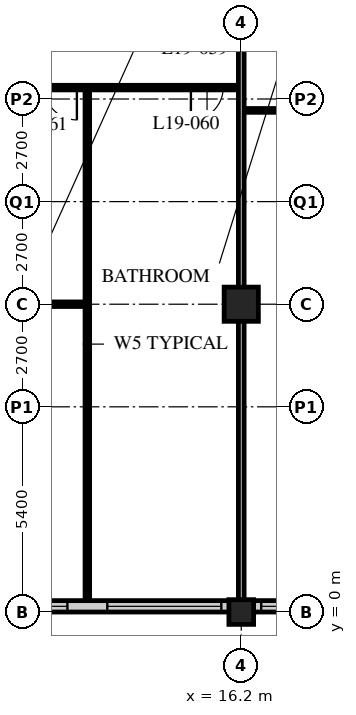
"""IFC4 building model, lengths in metres.
Left out: names, types, materials, properties, quantities, classifications, styles, units other than length and angle.
Written with IfcOpenShell. Run it as: python <this file> out.ifc"""

import sys

from ifc_helpers import new_model, si_unit, direction, frame, frame_2d, origin, origin_2d, place, context, subcontext, project, spatial, rectangle, hollow_rectangle, extrude, element, fill, save


model = new_model("IFC4")
c1 = context("Model", 3, precision=1e-05, world=origin(), true_north=direction((0.0, 1.0)))
c2 = subcontext(c1, "Body", "Model", "MODEL_VIEW")
j1 = project(units=[si_unit("LENGTHUNIT", "METRE"), si_unit("PLANEANGLEUNIT", "RADIAN")], contexts=[c1])
p1 = place(None, origin())
s1 = spatial("IfcSite", under=j1, at=p1, CompositionType="ELEMENT")
p2 = place(p1, origin())
s2 = spatial("IfcBuilding", under=s1, at=p2, CompositionType="ELEMENT")
p3 = place(p2, frame((0.0, 0.0, 77.2)))
s3 = spatial("IfcBuildingStorey", under=s2, at=p3, CompositionType="ELEMENT", Elevation=77.2)
p4 = place(p3, frame((16.2, 0.0, 0.0), z_axis=(0.0, 0.0, 1.0), x_axis=(1.0, 0.0, 0.0)))
e1 = element("IfcColumn", 1, at=p4, inside=s3, PredefinedType="COLUMN", context=c2, shape_type="SweptSolid", body=[
    extrude(hollow_rectangle(XDim=0.65, YDim=0.65, WallThickness=0.05, at=origin_2d()), origin(), (0.0, 0.0, 1.0), 3.4),
])
p5 = place(p3, frame((16.2, 8.1, 0.0), z_axis=(0.0, 0.0, 1.0), x_axis=(1.0, 0.0, 0.0)))
e2 = element("IfcColumn", 2, at=p5, inside=s3, PredefinedType="COLUMN", context=c2, shape_type="SweptSolid", body=[
    extrude(hollow_rectangle(XDim=0.9, YDim=0.9, WallThickness=0.09, at=origin_2d()), origin(), (0.0, 0.0, 1.0), 3.4),
])
p6 = place(p3, frame((8.4, 0.15, 0.0), z_axis=(0.0, 0.0, 1.0), x_axis=(1.0, 0.0, 0.0)))
e3 = element("IfcWall", 3, at=p6, inside=s3, PredefinedType="SOLIDWALL", context=c2, shape_type="SweptSolid", body=[
    extrude(rectangle(XDim=40.2, YDim=0.3, at=frame_2d((20.1, 0.0))), origin(), (0.0, 0.0, 1.0), 3.19),
])
p7 = place(p6, frame((0.225, 0.0, 0.9)))
e4 = element("IfcOpeningElement", 4, at=p7, cuts=e3, PredefinedType="OPENING", context=c2, shape_type="SweptSolid", body=[
    extrude(rectangle(XDim=3.0, YDim=1.5, at=frame_2d((1.5, 0.75))), frame((0.0, 0.16, 0.0), z_axis=(0.0, -1.0, 0.0), x_axis=(1.0, 0.0, 0.0)), (0.0, 0.0, 1.0), 0.32),
])
p8 = place(p6, frame((4.275, 0.0, 0.9)))
e5 = element("IfcOpeningElement", 5, at=p8, cuts=e3, PredefinedType="OPENING", context=c2, shape_type="SweptSolid", body=[
    extrude(rectangle(XDim=3.0, YDim=1.5, at=frame_2d((1.5, 0.75))), frame((0.0, 0.16, 0.0), z_axis=(0.0, -1.0, 0.0), x_axis=(1.0, 0.0, 0.0)), (0.0, 0.0, 1.0), 0.32),
])
p9 = place(p6, frame((8.325, 0.0, 0.9)))
e6 = element("IfcOpeningElement", 6, at=p9, cuts=e3, PredefinedType="OPENING", context=c2, shape_type="SweptSolid", body=[
    extrude(rectangle(XDim=3.0, YDim=1.5, at=frame_2d((1.5, 0.75))), frame((0.0, 0.16, 0.0), z_axis=(0.0, -1.0, 0.0), x_axis=(1.0, 0.0, 0.0)), (0.0, 0.0, 1.0), 0.32),
])
p10 = place(p6, frame((12.375, 0.0, 0.9)))
e7 = element("IfcOpeningElement", 7, at=p10, cuts=e3, PredefinedType="OPENING", context=c2, shape_type="SweptSolid", body=[
    extrude(rectangle(XDim=3.0, YDim=1.5, at=frame_2d((1.5, 0.75))), frame((0.0, 0.16, 0.0), z_axis=(0.0, -1.0, 0.0), x_axis=(1.0, 0.0, 0.0)), (0.0, 0.0, 1.0), 0.32),
])
p11 = place(p6, frame((16.425, 0.0, 0.9)))
e8 = element("IfcOpeningElement", 8, at=p11, cuts=e3, PredefinedType="OPENING", context=c2, shape_type="SweptSolid", body=[
    extrude(rectangle(XDim=3.0, YDim=1.5, at=frame_2d((1.5, 0.75))), frame((0.0, 0.16, 0.0), z_axis=(0.0, -1.0, 0.0), x_axis=(1.0, 0.0, 0.0)), (0.0, 0.0, 1.0), 0.32),
])
p12 = place(p6, frame((20.475, 0.0, 0.9)))
e9 = element("IfcOpeningElement", 9, at=p12, cuts=e3, PredefinedType="OPENING", context=c2, shape_type="SweptSolid", body=[
    extrude(rectangle(XDim=3.0, YDim=1.5, at=frame_2d((1.5, 0.75))), frame((0.0, 0.16, 0.0), z_axis=(0.0, -1.0, 0.0), x_axis=(1.0, 0.0, 0.0)), (0.0, 0.0, 1.0), 0.32),
])
p13 = place(p6, frame((24.525, 0.0, 0.9)))
e10 = element("IfcOpeningElement", 10, at=p13, cuts=e3, PredefinedType="OPENING", context=c2, shape_type="SweptSolid", body=[
    extrude(rectangle(XDim=3.0, YDim=1.5, at=frame_2d((1.5, 0.75))), frame((0.0, 0.16, 0.0), z_axis=(0.0, -1.0, 0.0), x_axis=(1.0, 0.0, 0.0)), (0.0, 0.0, 1.0), 0.32),
])
p14 = place(p6, frame((28.575, 0.0, 0.9)))
e11 = element("IfcOpeningElement", 11, at=p14, cuts=e3, PredefinedType="OPENING", context=c2, shape_type="SweptSolid", body=[
    extrude(rectangle(XDim=3.0, YDim=1.5, at=frame_2d((1.5, 0.75))), frame((0.0, 0.16, 0.0), z_axis=(0.0, -1.0, 0.0), x_axis=(1.0, 0.0, 0.0)), (0.0, 0.0, 1.0), 0.32),
])
p15 = place(p6, frame((32.625, 0.0, 0.9)))
e12 = element("IfcOpeningElement", 12, at=p15, cuts=e3, PredefinedType="OPENING", context=c2, shape_type="SweptSolid", body=[
    extrude(rectangle(XDim=3.0, YDim=1.5, at=frame_2d((1.5, 0.75))), frame((0.0, 0.16, 0.0), z_axis=(0.0, -1.0, 0.0), x_axis=(1.0, 0.0, 0.0)), (0.0, 0.0, 1.0), 0.32),
])
p16 = place(p6, frame((36.675, 0.0, 0.9)))
e13 = element("IfcOpeningElement", 13, at=p16, cuts=e3, PredefinedType="OPENING", context=c2, shape_type="SweptSolid", body=[
    extrude(rectangle(XDim=3.0, YDim=1.5, at=frame_2d((1.5, 0.75))), frame((0.0, 0.16, 0.0), z_axis=(0.0, -1.0, 0.0), x_axis=(1.0, 0.0, 0.0)), (0.0, 0.0, 1.0), 0.32),
])
p17 = place(p3, frame((16.2, 13.2, 0.0), z_axis=(0.0, 0.0, 1.0), x_axis=(1.0, 0.0, 0.0)))
e14 = element("IfcWall", 14, at=p17, inside=s3, PredefinedType="PARTITIONING", context=c2, shape_type="SweptSolid", body=[
    extrude(rectangle(XDim=2.3, YDim=0.1, at=frame_2d((1.15, 0.0))), origin(), (0.0, 0.0, 1.0), 3.19),
])
p18 = place(p3, frame((8.15, 13.8, 0.0), z_axis=(0.0, 0.0, 1.0), x_axis=(1.0, 0.0, 0.0)))
e15 = element("IfcWall", 15, at=p18, inside=s3, PredefinedType="PARTITIONING", context=c2, shape_type="SweptSolid", body=[
    extrude(rectangle(XDim=8.05, YDim=0.12, at=frame_2d((4.025, 0.0))), origin(), (0.0, 0.0, 1.0), 3.19),
])
p19 = place(p18, frame((6.725, 0.0, 0.0)))
e16 = element("IfcOpeningElement", 16, at=p19, cuts=e15, PredefinedType="OPENING", context=c2, shape_type="SweptSolid", body=[
    extrude(rectangle(XDim=0.85, YDim=2.1, at=frame_2d((0.425, 1.05))), frame((0.0, 0.07, 0.0), z_axis=(0.0, -1.0, 0.0), x_axis=(1.0, 0.0, 0.0)), (0.0, 0.0, 1.0), 0.14),
])
p20 = place(p18, frame((2.875, 0.0, 0.0)))
e17 = element("IfcOpeningElement", 17, at=p20, cuts=e15, PredefinedType="OPENING", context=c2, shape_type="SweptSolid", body=[
    extrude(rectangle(XDim=0.85, YDim=2.1, at=frame_2d((0.425, 1.05))), frame((0.0, 0.07, 0.0), z_axis=(0.0, -1.0, 0.0), x_axis=(1.0, 0.0, 0.0)), (0.0, 0.0, 1.0), 0.14),
])
p21 = place(p3, frame((12.15, 13.8, 0.0), z_axis=(0.0, 0.0, 1.0), x_axis=(0.0, -1.0, 0.0)))
e18 = element("IfcWall", 18, at=p21, inside=s3, PredefinedType="PARTITIONING", context=c2, shape_type="SweptSolid", body=[
    extrude(rectangle(XDim=13.5, YDim=0.12, at=frame_2d((6.75, 0.0))), origin(), (0.0, 0.0, 1.0), 3.19),
])
p22 = place(p3, frame((16.2, 16.2, 0.0), z_axis=(0.0, 0.0, 1.0), x_axis=(0.0, -1.0, 0.0)))
e19 = element("IfcWall", 19, at=p22, inside=s3, PredefinedType="PARTITIONING", context=c2, shape_type="SweptSolid", body=[
    extrude(rectangle(XDim=15.9, YDim=0.15, at=frame_2d((7.95, 0.0))), origin(), (0.0, 0.0, 1.0), 2.428),
])
p23 = place(p3, frame((12.15, 8.1, 0.0), z_axis=(0.0, 0.0, 1.0), x_axis=(-1.0, 0.0, 0.0)))
e20 = element("IfcWall", 20, at=p23, inside=s3, PredefinedType="PARTITIONING", context=c2, shape_type="SweptSolid", body=[
    extrude(rectangle(XDim=3.6, YDim=0.12, at=frame_2d((1.8, 0.0))), origin(), (0.0, 0.0, 1.0), 2.428),
])
p24 = place(p7, origin())
e21 = element("IfcWindow", 21, at=p24, inside=s3, PartitioningType="SINGLE_PANEL", PredefinedType="WINDOW", context=c2, shape_type="SweptSolid", body=[
    extrude(rectangle(XDim=3.0, YDim=1.5, at=frame_2d((1.5, 0.75))), frame((0.0, 0.03, 0.0), z_axis=(0.0, -1.0, 0.0), x_axis=(1.0, 0.0, 0.0)), (0.0, 0.0, 1.0), 0.06),
])
fill(e4, e21)
p25 = place(p8, origin())
e22 = element("IfcWindow", 22, at=p25, inside=s3, PartitioningType="SINGLE_PANEL", PredefinedType="WINDOW", context=c2, shape_type="SweptSolid", body=[
    extrude(rectangle(XDim=3.0, YDim=1.5, at=frame_2d((1.5, 0.75))), frame((0.0, 0.03, 0.0), z_axis=(0.0, -1.0, 0.0), x_axis=(1.0, 0.0, 0.0)), (0.0, 0.0, 1.0), 0.06),
])
fill(e5, e22)
p26 = place(p9, origin())
e23 = element("IfcWindow", 23, at=p26, inside=s3, PartitioningType="SINGLE_PANEL", PredefinedType="WINDOW", context=c2, shape_type="SweptSolid", body=[
    extrude(rectangle(XDim=3.0, YDim=1.5, at=frame_2d((1.5, 0.75))), frame((0.0, 0.03, 0.0), z_axis=(0.0, -1.0, 0.0), x_axis=(1.0, 0.0, 0.0)), (0.0, 0.0, 1.0), 0.06),
])
fill(e6, e23)
p27 = place(p19, origin())
e24 = element("IfcDoor", 24, at=p27, inside=s3, OperationType="SINGLE_SWING_RIGHT", PredefinedType="DOOR", context=c2, shape_type="SweptSolid", body=[
    extrude(rectangle(XDim=0.85, YDim=2.1, at=frame_2d((0.425, 1.05))), frame((0.0, 0.025, 0.0), z_axis=(0.0, -1.0, 0.0), x_axis=(1.0, 0.0, 0.0)), (0.0, 0.0, 1.0), 0.05),
])
fill(e16, e24)
p28 = place(p20, origin())
e25 = element("IfcDoor", 25, at=p28, inside=s3, OperationType="SINGLE_SWING_LEFT", PredefinedType="DOOR", context=c2, shape_type="SweptSolid", body=[
    extrude(rectangle(XDim=0.85, YDim=2.1, at=frame_2d((0.425, 1.05))), frame((0.0, 0.025, 0.0), z_axis=(0.0, -1.0, 0.0), x_axis=(1.0, 0.0, 0.0)), (0.0, 0.0, 1.0), 0.05),
])
fill(e17, e25)
save(model, sys.argv[1])
